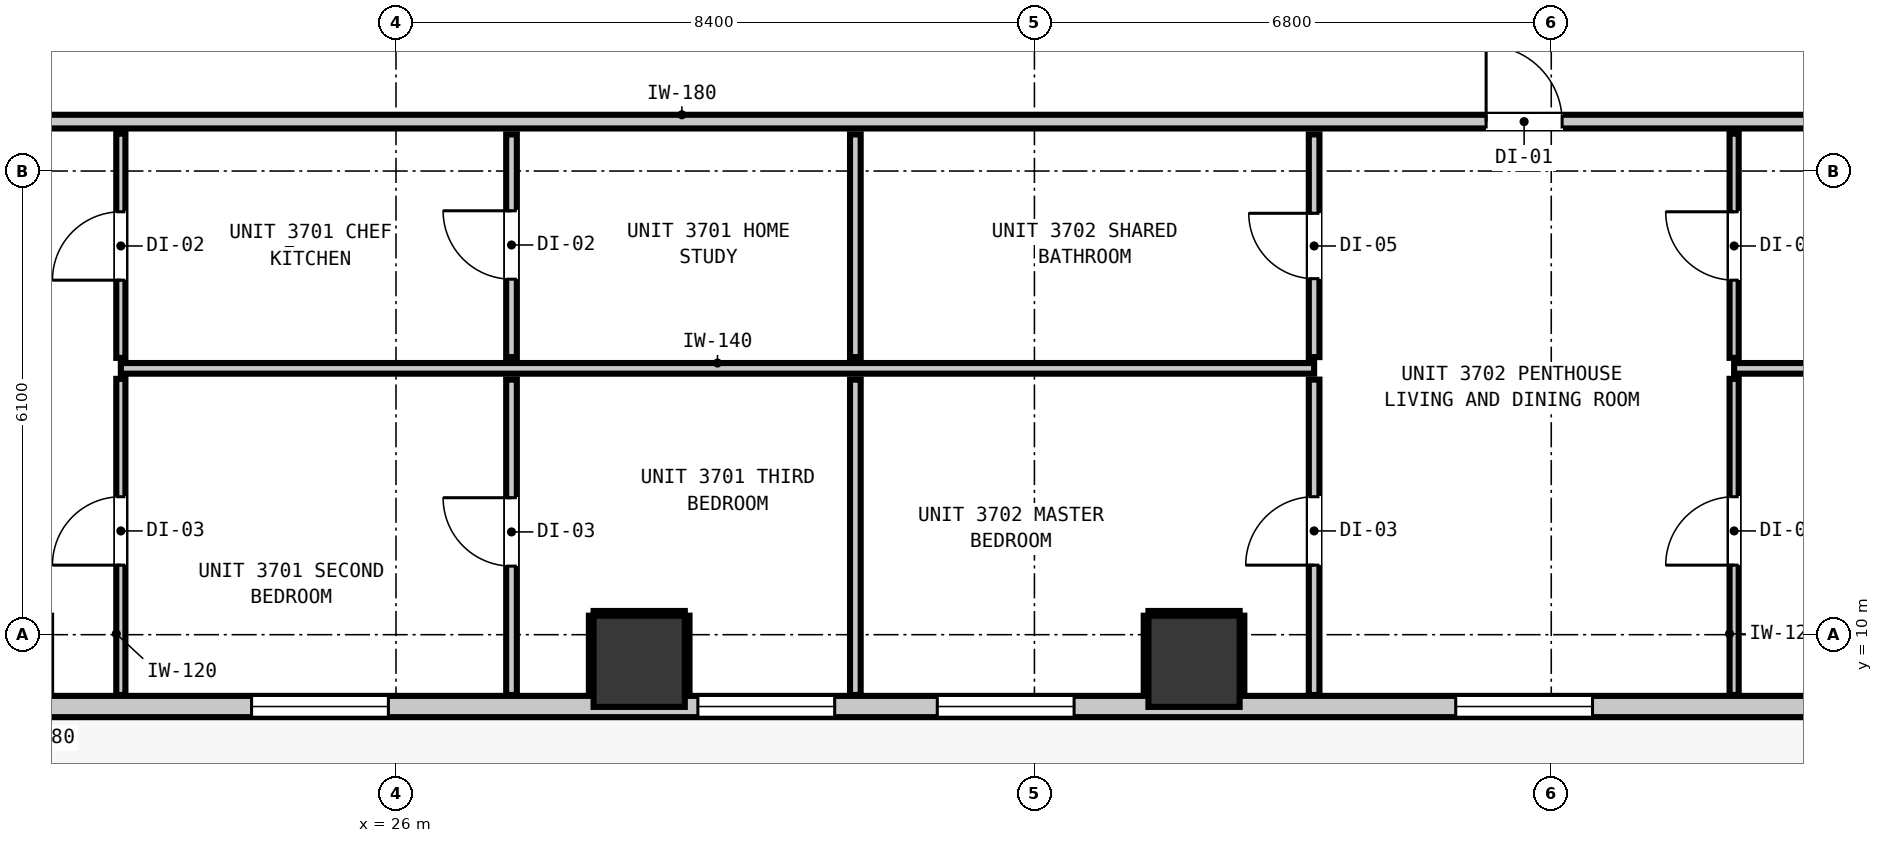
"""IFC4 building model, lengths in metres.
Left out: names, types, materials, properties, quantities, classifications, styles, units other than length and angle.
Written with IfcOpenShell. Run it as: python <this file> out.ifc"""

import sys

from ifc_helpers import new_model, si_unit, direction, frame, frame_2d, origin, origin_2d, place, context, subcontext, project, spatial, rectangle, extrude, element, fill, save


model = new_model("IFC4")
c1 = context("Model", 3, precision=1e-05, world=origin(), true_north=direction((0.0, 1.0)))
c2 = subcontext(c1, "Body", "Model", "MODEL_VIEW")
j1 = project(units=[si_unit("LENGTHUNIT", "METRE"), si_unit("PLANEANGLEUNIT", "RADIAN")], contexts=[c1])
p1 = place(None, origin())
s1 = spatial("IfcSite", under=j1, at=p1, CompositionType="ELEMENT")
p2 = place(p1, origin())
s2 = spatial("IfcBuilding", under=s1, at=p2, CompositionType="ELEMENT")
p3 = place(p2, frame((0.0, 0.0, 129.32)))
s3 = spatial("IfcBuildingStorey", under=s2, at=p3, CompositionType="ELEMENT", Elevation=129.32)
for number, where, z_axis, x_axis in (
    (1, (29.2, 9.65, 0.0), (0.0, 0.0, 1.0), (1.0, 0.0, 0.0)),
    (2, (36.5, 9.65, 0.0), (0.0, 0.0, 1.0), (1.0, 0.0, 0.0)),
):
    element("IfcColumn", number, at=place(p3, frame(where, z_axis=z_axis, x_axis=x_axis)), inside=s3, PredefinedType="COLUMN", context=c2, shape_type="SweptSolid", body=[
        extrude(rectangle(XDim=1.2, YDim=1.2, at=origin_2d()), origin(), (0.0, 0.0, 1.0), 3.32),
    ])
p4 = place(p3, frame((46.645, 9.055, 0.0), z_axis=(0.0, 0.0, 1.0), x_axis=(-1.0, 0.0, 0.0)))
e3 = element("IfcWall", 3, at=p4, inside=s3, PredefinedType="STANDARD", context=c2, shape_type="SweptSolid", body=[
    extrude(rectangle(XDim=35.09, YDim=0.28, at=frame_2d((17.545, 0.0))), origin(), (0.0, 0.0, 1.0), 3.08),
])
p5 = place(p4, frame((0.904, 0.0, 0.0)))
e4 = element("IfcOpeningElement", 4, at=p5, cuts=e3, PredefinedType="OPENING", context=c2, shape_type="SweptSolid", body=[
    extrude(rectangle(XDim=1.0, YDim=2.15, at=frame_2d((0.5, 1.075))), frame((0.0, 0.15, 0.0), z_axis=(0.0, -1.0, 0.0), x_axis=(1.0, 0.0, 0.0)), (0.0, 0.0, 1.0), 0.3),
])
p6 = place(p4, frame((28.105, 0.0, 0.85)))
e5 = element("IfcOpeningElement", 5, at=p6, cuts=e3, PredefinedType="OPENING", context=c2, shape_type="SweptSolid", body=[
    extrude(rectangle(XDim=1.8, YDim=1.9, at=frame_2d((0.9, 0.95))), frame((0.0, 0.15, 0.0), z_axis=(0.0, -1.0, 0.0), x_axis=(1.0, 0.0, 0.0)), (0.0, 0.0, 1.0), 0.3),
])
p7 = place(p4, frame((34.133, 0.0, 0.85)))
e6 = element("IfcOpeningElement", 6, at=p7, cuts=e3, PredefinedType="OPENING", context=c2, shape_type="SweptSolid", body=[
    extrude(rectangle(XDim=0.58, YDim=1.5, at=frame_2d((0.29, 0.75))), frame((0.0, 0.15, 0.0), z_axis=(0.0, -1.0, 0.0), x_axis=(1.0, 0.0, 0.0)), (0.0, 0.0, 1.0), 0.3),
])
p8 = place(p4, frame((20.745, 0.0, 0.85)))
e7 = element("IfcOpeningElement", 7, at=p8, cuts=e3, PredefinedType="OPENING", context=c2, shape_type="SweptSolid", body=[
    extrude(rectangle(XDim=1.8, YDim=1.9, at=frame_2d((0.9, 0.95))), frame((0.0, 0.15, 0.0), z_axis=(0.0, -1.0, 0.0), x_axis=(1.0, 0.0, 0.0)), (0.0, 0.0, 1.0), 0.3),
])
p9 = place(p4, frame((14.873, 0.0, 0.85)))
e8 = element("IfcOpeningElement", 8, at=p9, cuts=e3, PredefinedType="OPENING", context=c2, shape_type="SweptSolid", body=[
    extrude(rectangle(XDim=1.8, YDim=1.9, at=frame_2d((0.9, 0.95))), frame((0.0, 0.15, 0.0), z_axis=(0.0, -1.0, 0.0), x_axis=(1.0, 0.0, 0.0)), (0.0, 0.0, 1.0), 0.3),
])
p10 = place(p4, frame((4.902, 0.0, 0.85)))
e9 = element("IfcOpeningElement", 9, at=p10, cuts=e3, PredefinedType="OPENING", context=c2, shape_type="SweptSolid", body=[
    extrude(rectangle(XDim=1.8, YDim=1.9, at=frame_2d((0.9, 0.95))), frame((0.0, 0.15, 0.0), z_axis=(0.0, -1.0, 0.0), x_axis=(1.0, 0.0, 0.0)), (0.0, 0.0, 1.0), 0.3),
])
p11 = place(p4, frame((11.723, 0.0, 0.85)))
e10 = element("IfcOpeningElement", 10, at=p11, cuts=e3, PredefinedType="OPENING", context=c2, shape_type="SweptSolid", body=[
    extrude(rectangle(XDim=1.8, YDim=1.9, at=frame_2d((0.9, 0.95))), frame((0.0, 0.15, 0.0), z_axis=(0.0, -1.0, 0.0), x_axis=(1.0, 0.0, 0.0)), (0.0, 0.0, 1.0), 0.3),
])
p12 = place(p3, frame((9.407, 16.75, 0.0), z_axis=(0.0, 0.0, 1.0), x_axis=(1.0, 0.0, 0.0)))
e11 = element("IfcWall", 11, at=p12, inside=s3, PredefinedType="PARTITIONING", context=c2, shape_type="SweptSolid", body=[
    extrude(rectangle(XDim=39.386, YDim=0.18, at=frame_2d((19.693, 0.0))), origin(), (0.0, 0.0, 1.0), 3.08),
])
p13 = place(p12, frame((8.773, 0.0, 0.0)))
e12 = element("IfcOpeningElement", 12, at=p13, cuts=e11, PredefinedType="OPENING", context=c2, shape_type="SweptSolid", body=[
    extrude(rectangle(XDim=1.0, YDim=2.15, at=frame_2d((0.5, 1.075))), frame((0.0, 0.1, 0.0), z_axis=(0.0, -1.0, 0.0), x_axis=(1.0, 0.0, 0.0)), (0.0, 0.0, 1.0), 0.2),
])
p14 = place(p12, frame((30.936, 0.0, 0.0)))
e13 = element("IfcOpeningElement", 13, at=p14, cuts=e11, PredefinedType="OPENING", context=c2, shape_type="SweptSolid", body=[
    extrude(rectangle(XDim=1.0, YDim=2.15, at=frame_2d((0.5, 1.075))), frame((0.0, 0.1, 0.0), z_axis=(0.0, -1.0, 0.0), x_axis=(1.0, 0.0, 0.0)), (0.0, 0.0, 1.0), 0.2),
])
p15 = place(p3, frame((22.38, 13.504, 0.0), z_axis=(0.0, 0.0, 1.0), x_axis=(1.0, 0.0, 0.0)))
e14 = element("IfcWall", 14, at=p15, inside=s3, PredefinedType="PARTITIONING", context=c2, shape_type="SweptSolid", body=[
    extrude(rectangle(XDim=15.7, YDim=0.14, at=frame_2d((7.85, 0.0))), origin(), (0.0, 0.0, 1.0), 3.08),
])
p16 = place(p3, frame((43.606, 13.504, 0.0), z_axis=(0.0, 0.0, 1.0), x_axis=(1.0, 0.0, 0.0)))
e15 = element("IfcWall", 15, at=p16, inside=s3, PredefinedType="PARTITIONING", context=c2, shape_type="SweptSolid", body=[
    extrude(rectangle(XDim=5.187, YDim=0.14, at=frame_2d((2.594, 0.0))), origin(), (0.0, 0.0, 1.0), 3.08),
])
p17 = place(p3, frame((27.52, 9.207, 0.0), z_axis=(0.0, 0.0, 1.0), x_axis=(0.0, 1.0, 0.0)))
e16 = element("IfcWall", 16, at=p17, inside=s3, PredefinedType="PARTITIONING", context=c2, shape_type="SweptSolid", body=[
    extrude(rectangle(XDim=4.149, YDim=0.14, at=frame_2d((2.074, 0.0))), origin(), (0.0, 0.0, 1.0), 3.08),
])
p18 = place(p17, frame((1.695, 0.0, 0.0)))
e17 = element("IfcOpeningElement", 17, at=p18, cuts=e16, PredefinedType="OPENING", context=c2, shape_type="SweptSolid", body=[
    extrude(rectangle(XDim=0.9, YDim=2.1, at=frame_2d((0.45, 1.05))), frame((0.0, 0.08, 0.0), z_axis=(0.0, -1.0, 0.0), x_axis=(1.0, 0.0, 0.0)), (0.0, 0.0, 1.0), 0.16),
])
p19 = place(p3, frame((27.52, 13.652, 0.0), z_axis=(0.0, 0.0, 1.0), x_axis=(0.0, 1.0, 0.0)))
e18 = element("IfcWall", 18, at=p19, inside=s3, PredefinedType="PARTITIONING", context=c2, shape_type="SweptSolid", body=[
    extrude(rectangle(XDim=2.93, YDim=0.14, at=frame_2d((1.465, 0.0))), origin(), (0.0, 0.0, 1.0), 3.08),
])
p20 = place(p19, frame((1.025, 0.0, 0.0)))
e19 = element("IfcOpeningElement", 19, at=p20, cuts=e18, PredefinedType="OPENING", context=c2, shape_type="SweptSolid", body=[
    extrude(rectangle(XDim=0.9, YDim=2.1, at=frame_2d((0.45, 1.05))), frame((0.0, 0.08, 0.0), z_axis=(0.0, -1.0, 0.0), x_axis=(1.0, 0.0, 0.0)), (0.0, 0.0, 1.0), 0.16),
])
p21 = place(p3, frame((32.044, 9.207, 0.0), z_axis=(0.0, 0.0, 1.0), x_axis=(0.0, 1.0, 0.0)))
e20 = element("IfcWall", 20, at=p21, inside=s3, PredefinedType="PARTITIONING", context=c2, shape_type="SweptSolid", body=[
    extrude(rectangle(XDim=4.149, YDim=0.14, at=frame_2d((2.074, 0.0))), origin(), (0.0, 0.0, 1.0), 3.08),
])
p22 = place(p3, frame((32.044, 13.652, 0.0), z_axis=(0.0, 0.0, 1.0), x_axis=(0.0, 1.0, 0.0)))
e21 = element("IfcWall", 21, at=p22, inside=s3, PredefinedType="PARTITIONING", context=c2, shape_type="SweptSolid", body=[
    extrude(rectangle(XDim=2.93, YDim=0.14, at=frame_2d((1.465, 0.0))), origin(), (0.0, 0.0, 1.0), 3.08),
])
p23 = place(p3, frame((38.08, 9.207, 0.0), z_axis=(0.0, 0.0, 1.0), x_axis=(0.0, 1.0, 0.0)))
e22 = element("IfcWall", 22, at=p23, inside=s3, PredefinedType="PARTITIONING", context=c2, shape_type="SweptSolid", body=[
    extrude(rectangle(XDim=4.149, YDim=0.14, at=frame_2d((2.074, 0.0))), origin(), (0.0, 0.0, 1.0), 3.08),
])
p24 = place(p23, frame((1.708, 0.0, 0.0)))
e23 = element("IfcOpeningElement", 23, at=p24, cuts=e22, PredefinedType="OPENING", context=c2, shape_type="SweptSolid", body=[
    extrude(rectangle(XDim=0.9, YDim=2.1, at=frame_2d((0.45, 1.05))), frame((0.0, 0.08, 0.0), z_axis=(0.0, -1.0, 0.0), x_axis=(1.0, 0.0, 0.0)), (0.0, 0.0, 1.0), 0.16),
])
p25 = place(p3, frame((38.08, 13.652, 0.0), z_axis=(0.0, 0.0, 1.0), x_axis=(0.0, 1.0, 0.0)))
e24 = element("IfcWall", 24, at=p25, inside=s3, PredefinedType="PARTITIONING", context=c2, shape_type="SweptSolid", body=[
    extrude(rectangle(XDim=2.93, YDim=0.14, at=frame_2d((1.465, 0.0))), origin(), (0.0, 0.0, 1.0), 3.08),
])
p26 = place(p25, frame((1.032, 0.0, 0.0)))
e25 = element("IfcOpeningElement", 25, at=p26, cuts=e24, PredefinedType="OPENING", context=c2, shape_type="SweptSolid", body=[
    extrude(rectangle(XDim=0.86, YDim=2.02, at=frame_2d((0.43, 1.01))), frame((0.0, 0.08, 0.0), z_axis=(0.0, -1.0, 0.0), x_axis=(1.0, 0.0, 0.0)), (0.0, 0.0, 1.0), 0.16),
])
p27 = place(p3, frame((22.38, 9.207, 0.0), z_axis=(0.0, 0.0, 1.0), x_axis=(0.0, 1.0, 0.0)))
e26 = element("IfcWall", 26, at=p27, inside=s3, PredefinedType="PARTITIONING", context=c2, shape_type="SweptSolid", body=[
    extrude(rectangle(XDim=4.159, YDim=0.12, at=frame_2d((2.08, 0.0))), origin(), (0.0, 0.0, 1.0), 3.08),
])
p28 = place(p27, frame((1.708, 0.0, 0.0)))
e27 = element("IfcOpeningElement", 27, at=p28, cuts=e26, PredefinedType="OPENING", context=c2, shape_type="SweptSolid", body=[
    extrude(rectangle(XDim=0.9, YDim=2.1, at=frame_2d((0.45, 1.05))), frame((0.0, 0.07, 0.0), z_axis=(0.0, -1.0, 0.0), x_axis=(1.0, 0.0, 0.0)), (0.0, 0.0, 1.0), 0.14),
])
p29 = place(p3, frame((22.38, 13.642, 0.0), z_axis=(0.0, 0.0, 1.0), x_axis=(0.0, 1.0, 0.0)))
e28 = element("IfcWall", 28, at=p29, inside=s3, PredefinedType="PARTITIONING", context=c2, shape_type="SweptSolid", body=[
    extrude(rectangle(XDim=2.95, YDim=0.12, at=frame_2d((1.475, 0.0))), origin(), (0.0, 0.0, 1.0), 3.08),
])
p30 = place(p29, frame((1.022, 0.0, 0.0)))
e29 = element("IfcOpeningElement", 29, at=p30, cuts=e28, PredefinedType="OPENING", context=c2, shape_type="SweptSolid", body=[
    extrude(rectangle(XDim=0.9, YDim=2.1, at=frame_2d((0.45, 1.05))), frame((0.0, 0.07, 0.0), z_axis=(0.0, -1.0, 0.0), x_axis=(1.0, 0.0, 0.0)), (0.0, 0.0, 1.0), 0.14),
])
p31 = place(p3, frame((43.606, 9.207, 0.0), z_axis=(0.0, 0.0, 1.0), x_axis=(0.0, 1.0, 0.0)))
e30 = element("IfcWall", 30, at=p31, inside=s3, PredefinedType="PARTITIONING", context=c2, shape_type="SweptSolid", body=[
    extrude(rectangle(XDim=4.159, YDim=0.12, at=frame_2d((2.08, 0.0))), origin(), (0.0, 0.0, 1.0), 3.08),
])
p32 = place(p31, frame((1.708, 0.0, 0.0)))
e31 = element("IfcOpeningElement", 31, at=p32, cuts=e30, PredefinedType="OPENING", context=c2, shape_type="SweptSolid", body=[
    extrude(rectangle(XDim=0.9, YDim=2.1, at=frame_2d((0.45, 1.05))), frame((0.0, 0.07, 0.0), z_axis=(0.0, -1.0, 0.0), x_axis=(1.0, 0.0, 0.0)), (0.0, 0.0, 1.0), 0.14),
])
p33 = place(p3, frame((43.606, 13.642, 0.0), z_axis=(0.0, 0.0, 1.0), x_axis=(0.0, 1.0, 0.0)))
e32 = element("IfcWall", 32, at=p33, inside=s3, PredefinedType="PARTITIONING", context=c2, shape_type="SweptSolid", body=[
    extrude(rectangle(XDim=2.95, YDim=0.12, at=frame_2d((1.475, 0.0))), origin(), (0.0, 0.0, 1.0), 3.08),
])
p34 = place(p33, frame((1.022, 0.0, 0.0)))
e33 = element("IfcOpeningElement", 33, at=p34, cuts=e32, PredefinedType="OPENING", context=c2, shape_type="SweptSolid", body=[
    extrude(rectangle(XDim=0.9, YDim=2.1, at=frame_2d((0.45, 1.05))), frame((0.0, 0.07, 0.0), z_axis=(0.0, -1.0, 0.0), x_axis=(1.0, 0.0, 0.0)), (0.0, 0.0, 1.0), 0.14),
])
p35 = place(p3, frame((28.6, 10.282, 0.0), z_axis=(0.0, 0.0, 1.0), x_axis=(1.0, 0.0, 0.0)))
e34 = element("IfcWall", 34, at=p35, inside=s3, PredefinedType="PARTITIONING", context=c2, shape_type="SweptSolid", body=[
    extrude(rectangle(XDim=1.2, YDim=0.06, at=frame_2d((0.6, 0.0))), origin(), (0.0, 0.0, 1.0), 1.45),
])
for number, where, z_axis, x_axis in (
    (35, (28.568, 9.21, 0.0), (0.0, 0.0, 1.0), (0.0, 1.0, 0.0)),
    (36, (29.832, 9.21, 0.0), (0.0, 0.0, 1.0), (0.0, 1.0, 0.0)),
):
    element("IfcWall", number, at=place(p3, frame(where, z_axis=z_axis, x_axis=x_axis)), inside=s3, PredefinedType="PARTITIONING", context=c2, shape_type="SweptSolid", body=[
        extrude(rectangle(XDim=1.04, YDim=0.06, at=frame_2d((0.52, 0.0))), origin(), (0.0, 0.0, 1.0), 1.45),
    ])
p36 = place(p3, frame((35.9, 10.282, 0.0), z_axis=(0.0, 0.0, 1.0), x_axis=(1.0, 0.0, 0.0)))
e37 = element("IfcWall", 37, at=p36, inside=s3, PredefinedType="PARTITIONING", context=c2, shape_type="SweptSolid", body=[
    extrude(rectangle(XDim=1.2, YDim=0.06, at=frame_2d((0.6, 0.0))), origin(), (0.0, 0.0, 1.0), 1.45),
])
for number, where, z_axis, x_axis in (
    (38, (35.868, 9.21, 0.0), (0.0, 0.0, 1.0), (0.0, 1.0, 0.0)),
    (39, (37.132, 9.21, 0.0), (0.0, 0.0, 1.0), (0.0, 1.0, 0.0)),
):
    element("IfcWall", number, at=place(p3, frame(where, z_axis=z_axis, x_axis=x_axis)), inside=s3, PredefinedType="PARTITIONING", context=c2, shape_type="SweptSolid", body=[
        extrude(rectangle(XDim=1.04, YDim=0.06, at=frame_2d((0.52, 0.0))), origin(), (0.0, 0.0, 1.0), 1.45),
    ])
p37 = place(p8, origin())
e40 = element("IfcWindow", 40, at=p37, inside=s3, PartitioningType="SINGLE_PANEL", PredefinedType="WINDOW", context=c2, shape_type="SweptSolid", body=[
    extrude(rectangle(XDim=1.8, YDim=1.9, at=frame_2d((0.9, 0.95))), frame((0.0, 0.03, 0.0), z_axis=(0.0, -1.0, 0.0), x_axis=(1.0, 0.0, 0.0)), (0.0, 0.0, 1.0), 0.06),
])
fill(e7, e40)
p38 = place(p9, origin())
e41 = element("IfcWindow", 41, at=p38, inside=s3, PartitioningType="SINGLE_PANEL", PredefinedType="WINDOW", context=c2, shape_type="SweptSolid", body=[
    extrude(rectangle(XDim=1.8, YDim=1.9, at=frame_2d((0.9, 0.95))), frame((0.0, 0.03, 0.0), z_axis=(0.0, -1.0, 0.0), x_axis=(1.0, 0.0, 0.0)), (0.0, 0.0, 1.0), 0.06),
])
fill(e8, e41)
p39 = place(p10, origin())
e42 = element("IfcWindow", 42, at=p39, inside=s3, PartitioningType="SINGLE_PANEL", PredefinedType="WINDOW", context=c2, shape_type="SweptSolid", body=[
    extrude(rectangle(XDim=1.8, YDim=1.9, at=frame_2d((0.9, 0.95))), frame((0.0, 0.03, 0.0), z_axis=(0.0, -1.0, 0.0), x_axis=(1.0, 0.0, 0.0)), (0.0, 0.0, 1.0), 0.06),
])
fill(e9, e42)
p40 = place(p11, origin())
e43 = element("IfcWindow", 43, at=p40, inside=s3, PartitioningType="SINGLE_PANEL", PredefinedType="WINDOW", context=c2, shape_type="SweptSolid", body=[
    extrude(rectangle(XDim=1.8, YDim=1.9, at=frame_2d((0.9, 0.95))), frame((0.0, 0.03, 0.0), z_axis=(0.0, -1.0, 0.0), x_axis=(1.0, 0.0, 0.0)), (0.0, 0.0, 1.0), 0.06),
])
fill(e10, e43)
p41 = place(p30, origin())
e44 = element("IfcDoor", 44, at=p41, inside=s3, OperationType="SINGLE_SWING_LEFT", PredefinedType="DOOR", context=c2, shape_type="SweptSolid", body=[
    extrude(rectangle(XDim=0.9, YDim=2.1, at=frame_2d((0.45, 1.05))), frame((0.0, 0.025, 0.0), z_axis=(0.0, -1.0, 0.0), x_axis=(1.0, 0.0, 0.0)), (0.0, 0.0, 1.0), 0.05),
])
fill(e29, e44)
p42 = place(p20, origin())
e45 = element("IfcDoor", 45, at=p42, inside=s3, OperationType="SINGLE_SWING_RIGHT", PredefinedType="DOOR", context=c2, shape_type="SweptSolid", body=[
    extrude(rectangle(XDim=0.9, YDim=2.1, at=frame_2d((0.45, 1.05))), frame((0.0, 0.025, 0.0), z_axis=(0.0, -1.0, 0.0), x_axis=(1.0, 0.0, 0.0)), (0.0, 0.0, 1.0), 0.05),
])
fill(e19, e45)
p43 = place(p28, origin())
e46 = element("IfcDoor", 46, at=p43, inside=s3, OperationType="SINGLE_SWING_LEFT", PredefinedType="DOOR", context=c2, shape_type="SweptSolid", body=[
    extrude(rectangle(XDim=0.9, YDim=2.1, at=frame_2d((0.45, 1.05))), frame((0.0, 0.025, 0.0), z_axis=(0.0, -1.0, 0.0), x_axis=(1.0, 0.0, 0.0)), (0.0, 0.0, 1.0), 0.05),
])
fill(e27, e46)
p44 = place(p18, origin())
e47 = element("IfcDoor", 47, at=p44, inside=s3, OperationType="SINGLE_SWING_RIGHT", PredefinedType="DOOR", context=c2, shape_type="SweptSolid", body=[
    extrude(rectangle(XDim=0.9, YDim=2.1, at=frame_2d((0.45, 1.05))), frame((0.0, 0.025, 0.0), z_axis=(0.0, -1.0, 0.0), x_axis=(1.0, 0.0, 0.0)), (0.0, 0.0, 1.0), 0.05),
])
fill(e17, e47)
p45 = place(p14, origin())
e48 = element("IfcDoor", 48, at=p45, inside=s3, OperationType="SINGLE_SWING_LEFT", PredefinedType="DOOR", context=c2, shape_type="SweptSolid", body=[
    extrude(rectangle(XDim=1.0, YDim=2.15, at=frame_2d((0.5, 1.075))), frame((0.0, 0.025, 0.0), z_axis=(0.0, -1.0, 0.0), x_axis=(1.0, 0.0, 0.0)), (0.0, 0.0, 1.0), 0.05),
])
fill(e13, e48)
p46 = place(p26, origin())
e49 = element("IfcDoor", 49, at=p46, inside=s3, OperationType="SINGLE_SWING_RIGHT", PredefinedType="DOOR", context=c2, shape_type="SweptSolid", body=[
    extrude(rectangle(XDim=0.86, YDim=2.02, at=frame_2d((0.43, 1.01))), frame((0.0, 0.025, 0.0), z_axis=(0.0, -1.0, 0.0), x_axis=(1.0, 0.0, 0.0)), (0.0, 0.0, 1.0), 0.05),
])
fill(e25, e49)
p47 = place(p24, origin())
e50 = element("IfcDoor", 50, at=p47, inside=s3, OperationType="SINGLE_SWING_LEFT", PredefinedType="DOOR", context=c2, shape_type="SweptSolid", body=[
    extrude(rectangle(XDim=0.9, YDim=2.1, at=frame_2d((0.45, 1.05))), frame((0.0, 0.025, 0.0), z_axis=(0.0, -1.0, 0.0), x_axis=(1.0, 0.0, 0.0)), (0.0, 0.0, 1.0), 0.05),
])
fill(e23, e50)
p48 = place(p34, origin())
e51 = element("IfcDoor", 51, at=p48, inside=s3, OperationType="SINGLE_SWING_RIGHT", PredefinedType="DOOR", context=c2, shape_type="SweptSolid", body=[
    extrude(rectangle(XDim=0.9, YDim=2.1, at=frame_2d((0.45, 1.05))), frame((0.0, 0.025, 0.0), z_axis=(0.0, -1.0, 0.0), x_axis=(1.0, 0.0, 0.0)), (0.0, 0.0, 1.0), 0.05),
])
fill(e33, e51)
p49 = place(p32, origin())
e52 = element("IfcDoor", 52, at=p49, inside=s3, OperationType="SINGLE_SWING_LEFT", PredefinedType="DOOR", context=c2, shape_type="SweptSolid", body=[
    extrude(rectangle(XDim=0.9, YDim=2.1, at=frame_2d((0.45, 1.05))), frame((0.0, 0.025, 0.0), z_axis=(0.0, -1.0, 0.0), x_axis=(1.0, 0.0, 0.0)), (0.0, 0.0, 1.0), 0.05),
])
fill(e31, e52)
save(model, sys.argv[1])
